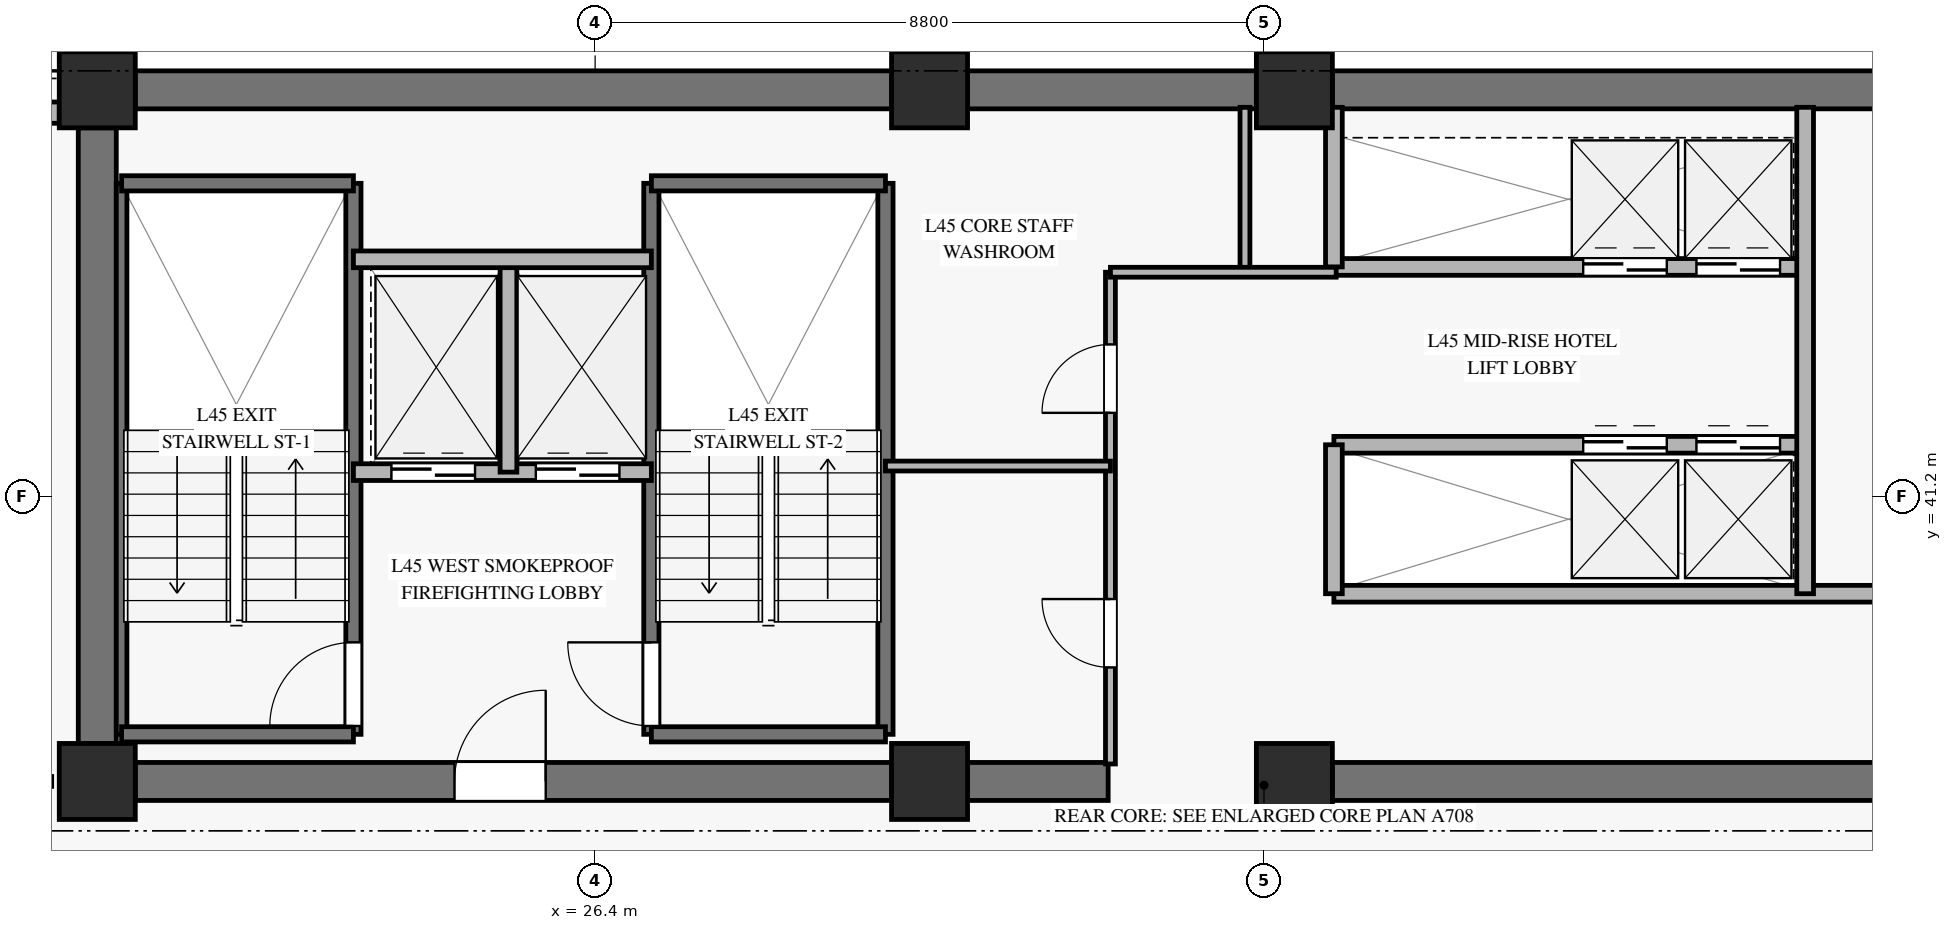
"""IFC4 building model, lengths in metres.
Left out: names, types, materials, properties, quantities, classifications, styles, units other than length and angle.
Written with IfcOpenShell. Run it as: python <this file> out.ifc"""

import sys

from ifc_helpers import new_model, si_unit, direction, frame, frame_2d, origin, origin_2d, place, context, subcontext, project, spatial, rectangle, extrude, source, transform, mapped, element, fill, save


model = new_model("IFC4")
c1 = context("Model", 3, precision=1e-05, world=origin(), true_north=direction((0.0, 1.0)))
c2 = subcontext(c1, "Body", "Model", "MODEL_VIEW")
j1 = project(units=[si_unit("LENGTHUNIT", "METRE"), si_unit("PLANEANGLEUNIT", "RADIAN")], contexts=[c1])
p1 = place(None, origin())
s1 = spatial("IfcSite", under=j1, at=p1, CompositionType="ELEMENT")
p2 = place(p1, origin())
s2 = spatial("IfcBuilding", under=s1, at=p2, CompositionType="ELEMENT")
p3 = place(p2, frame((0.0, 0.0, 180.7)))
s3 = spatial("IfcBuildingStorey", under=s2, at=p3, CompositionType="ELEMENT", Elevation=180.7)
m1 = source(origin(), c2, "Body", "SweptSolid", [
    extrude(rectangle(XDim=1.0, YDim=1.0, at=origin_2d()), origin(), (0.0, 0.0, 1.0), 3.27),
])
for number, where, z_axis, x_axis in (
    (1, (19.85, 37.45, 0.0), (0.0, 0.0, 1.0), (1.0, 0.0, 0.0)),
    (2, (19.85, 46.55, 0.0), (0.0, 0.0, 1.0), (1.0, 0.0, 0.0)),
    (3, (30.8, 37.45, 0.0), (0.0, 0.0, 1.0), (1.0, 0.0, 0.0)),
    (4, (30.8, 46.55, 0.0), (0.0, 0.0, 1.0), (1.0, 0.0, 0.0)),
    (5, (35.6, 37.45, 0.0), (0.0, 0.0, 1.0), (1.0, 0.0, 0.0)),
    (6, (35.6, 46.55, 0.0), (0.0, 0.0, 1.0), (1.0, 0.0, 0.0)),
):
    element("IfcColumn", number, at=place(p3, frame(where, z_axis=z_axis, x_axis=x_axis)), inside=s3, PredefinedType="PILASTER", context=c2, shape_type="MappedRepresentation", body=[
        mapped(m1, transform((0.0, 0.0, 0.0), x_axis=(1.0, 0.0, 0.0), y_axis=(0.0, 1.0, 0.0), z_axis=(0.0, 0.0, 1.0), scale=1.0)),
    ])
p4 = place(p3, frame((20.35, 46.55, 0.0), z_axis=(0.0, 0.0, 1.0), x_axis=(1.0, 0.0, 0.0)))
e7 = element("IfcWall", 7, at=p4, inside=s3, PredefinedType="SHEAR", context=c2, shape_type="SweptSolid", body=[
    extrude(rectangle(XDim=9.95, YDim=0.5, at=frame_2d((4.975, 0.0))), origin(), (0.0, 0.0, 1.0), 3.27),
])
p5 = place(p3, frame((31.3, 46.55, 0.0), z_axis=(0.0, 0.0, 1.0), x_axis=(1.0, 0.0, 0.0)))
e8 = element("IfcWall", 8, at=p5, inside=s3, PredefinedType="SHEAR", context=c2, shape_type="SweptSolid", body=[
    extrude(rectangle(XDim=3.8, YDim=0.5, at=frame_2d((1.9, 0.0))), origin(), (0.0, 0.0, 1.0), 3.27),
])
p6 = place(p3, frame((36.1, 46.55, 0.0), z_axis=(0.0, 0.0, 1.0), x_axis=(1.0, 0.0, 0.0)))
e9 = element("IfcWall", 9, at=p6, inside=s3, PredefinedType="SHEAR", context=c2, shape_type="SweptSolid", body=[
    extrude(rectangle(XDim=7.7, YDim=0.5, at=frame_2d((3.85, 0.0))), origin(), (0.0, 0.0, 1.0), 3.27),
])
p7 = place(p3, frame((20.35, 37.45, 0.0), z_axis=(0.0, 0.0, 1.0), x_axis=(1.0, 0.0, 0.0)))
e10 = element("IfcWall", 10, at=p7, inside=s3, PredefinedType="SHEAR", context=c2, shape_type="SweptSolid", body=[
    extrude(rectangle(XDim=9.95, YDim=0.5, at=frame_2d((4.975, 0.0))), origin(), (0.0, 0.0, 1.0), 3.27),
])
p8 = place(p7, frame((4.2, 0.0, 0.0)))
e11 = element("IfcOpeningElement", 11, at=p8, cuts=e10, PredefinedType="OPENING", context=c2, shape_type="SweptSolid", body=[
    extrude(rectangle(XDim=1.2, YDim=2.15, at=frame_2d((0.6, 1.075))), frame((0.0, 0.26, 0.0), z_axis=(0.0, -1.0, 0.0), x_axis=(1.0, 0.0, 0.0)), (0.0, 0.0, 1.0), 0.52),
])
p9 = place(p3, frame((31.3, 37.45, 0.0), z_axis=(0.0, 0.0, 1.0), x_axis=(1.0, 0.0, 0.0)))
e12 = element("IfcWall", 12, at=p9, inside=s3, PredefinedType="SHEAR", context=c2, shape_type="SweptSolid", body=[
    extrude(rectangle(XDim=1.85, YDim=0.5, at=frame_2d((0.925, 0.0))), origin(), (0.0, 0.0, 1.0), 3.27),
])
p10 = place(p3, frame((36.1, 37.45, 0.0), z_axis=(0.0, 0.0, 1.0), x_axis=(1.0, 0.0, 0.0)))
e13 = element("IfcWall", 13, at=p10, inside=s3, PredefinedType="SHEAR", context=c2, shape_type="SweptSolid", body=[
    extrude(rectangle(XDim=7.7, YDim=0.5, at=frame_2d((3.85, 0.0))), origin(), (0.0, 0.0, 1.0), 3.27),
])
p11 = place(p3, frame((19.85, 37.95, 0.0), z_axis=(0.0, 0.0, 1.0), x_axis=(0.0, 1.0, 0.0)))
e14 = element("IfcWall", 14, at=p11, inside=s3, PredefinedType="SHEAR", context=c2, shape_type="SweptSolid", body=[
    extrude(rectangle(XDim=8.1, YDim=0.5, at=frame_2d((4.05, 0.0))), origin(), (0.0, 0.0, 1.0), 3.27),
])
p12 = place(p3, frame((9.365, 46.25, 0.0), z_axis=(0.0, 0.0, 1.0), x_axis=(1.0, 0.0, 0.0)))
e15 = element("IfcWall", 15, at=p12, inside=s3, PredefinedType="SOLIDWALL", context=c2, shape_type="SweptSolid", body=[
    extrude(rectangle(XDim=9.985, YDim=0.28, at=frame_2d((4.993, 0.0))), origin(), (0.0, 0.0, 1.0), 2.75),
])
p13 = place(p12, frame((4.193, 0.0, 0.45)))
e16 = element("IfcOpeningElement", 16, at=p13, cuts=e15, PredefinedType="OPENING", context=c2, shape_type="SweptSolid", body=[
    extrude(rectangle(XDim=1.6, YDim=2.0, at=frame_2d((0.8, 1.0))), frame((0.0, 0.15, 0.0), z_axis=(0.0, -1.0, 0.0), x_axis=(1.0, 0.0, 0.0)), (0.0, 0.0, 1.0), 0.3),
])
p14 = place(p3, frame((20.17, 38.07, 0.0), z_axis=(0.0, 0.0, 1.0), x_axis=(0.0, 1.0, 0.0)))
e17 = element("IfcWall", 17, at=p14, inside=s3, PredefinedType="SOLIDWALL", context=c2, shape_type="SweptSolid", body=[
    extrude(rectangle(XDim=7.25, YDim=0.14, at=frame_2d((3.625, 0.0))), origin(), (0.0, 0.0, 1.0), 3.5),
])
p15 = place(p3, frame((23.22, 38.07, 0.0), z_axis=(0.0, 0.0, 1.0), x_axis=(0.0, 1.0, 0.0)))
e18 = element("IfcWall", 18, at=p15, inside=s3, PredefinedType="SOLIDWALL", context=c2, shape_type="SweptSolid", body=[
    extrude(rectangle(XDim=7.25, YDim=0.2, at=frame_2d((3.625, 0.0))), origin(), (0.0, 0.0, 1.0), 3.5),
])
p16 = place(p15, frame((0.11, 0.0, 0.0)))
e19 = element("IfcOpeningElement", 19, at=p16, cuts=e18, PredefinedType="OPENING", context=c2, shape_type="SweptSolid", body=[
    extrude(rectangle(XDim=1.1, YDim=2.15, at=frame_2d((0.55, 1.075))), frame((0.0, 0.11, 0.0), z_axis=(0.0, -1.0, 0.0), x_axis=(1.0, 0.0, 0.0)), (0.0, 0.0, 1.0), 0.22),
])
for number, where, z_axis, x_axis in (
    (20, (20.17, 45.32, 0.0), (0.0, 0.0, 1.0), (1.0, 0.0, 0.0)),
    (21, (20.17, 38.07, 0.0), (0.0, 0.0, 1.0), (1.0, 0.0, 0.0)),
):
    element("IfcWall", number, at=place(p3, frame(where, z_axis=z_axis, x_axis=x_axis)), inside=s3, PredefinedType="SOLIDWALL", context=c2, shape_type="SweptSolid", body=[
        extrude(rectangle(XDim=3.05, YDim=0.2, at=frame_2d((1.525, 0.0))), origin(), (0.0, 0.0, 1.0), 3.5),
    ])
p17 = place(p3, frame((27.14, 38.07, 0.0), z_axis=(0.0, 0.0, 1.0), x_axis=(0.0, 1.0, 0.0)))
e22 = element("IfcWall", 22, at=p17, inside=s3, PredefinedType="SOLIDWALL", context=c2, shape_type="SweptSolid", body=[
    extrude(rectangle(XDim=7.25, YDim=0.2, at=frame_2d((3.625, 0.0))), origin(), (0.0, 0.0, 1.0), 3.5),
])
p18 = place(p17, frame((0.11, 0.0, 0.0)))
e23 = element("IfcOpeningElement", 23, at=p18, cuts=e22, PredefinedType="OPENING", context=c2, shape_type="SweptSolid", body=[
    extrude(rectangle(XDim=1.1, YDim=2.15, at=frame_2d((0.55, 1.075))), frame((0.0, 0.11, 0.0), z_axis=(0.0, -1.0, 0.0), x_axis=(1.0, 0.0, 0.0)), (0.0, 0.0, 1.0), 0.22),
])
p19 = place(p3, frame((30.22, 38.07, 0.0), z_axis=(0.0, 0.0, 1.0), x_axis=(0.0, 1.0, 0.0)))
e24 = element("IfcWall", 24, at=p19, inside=s3, PredefinedType="SOLIDWALL", context=c2, shape_type="SweptSolid", body=[
    extrude(rectangle(XDim=7.25, YDim=0.2, at=frame_2d((3.625, 0.0))), origin(), (0.0, 0.0, 1.0), 3.5),
])
for number, where, z_axis, x_axis in (
    (25, (27.14, 45.32, 0.0), (0.0, 0.0, 1.0), (1.0, 0.0, 0.0)),
    (26, (27.14, 38.07, 0.0), (0.0, 0.0, 1.0), (1.0, 0.0, 0.0)),
):
    element("IfcWall", number, at=place(p3, frame(where, z_axis=z_axis, x_axis=x_axis)), inside=s3, PredefinedType="SOLIDWALL", context=c2, shape_type="SweptSolid", body=[
        extrude(rectangle(XDim=3.08, YDim=0.2, at=frame_2d((1.54, 0.0))), origin(), (0.0, 0.0, 1.0), 3.5),
    ])
p20 = place(p3, frame((23.22, 41.52, 0.0), z_axis=(0.0, 0.0, 1.0), x_axis=(1.0, 0.0, 0.0)))
e27 = element("IfcWall", 27, at=p20, inside=s3, PredefinedType="SOLIDWALL", context=c2, shape_type="SweptSolid", body=[
    extrude(rectangle(XDim=3.92, YDim=0.22, at=frame_2d((1.96, 0.0))), origin(), (0.0, 0.0, 1.0), 3.27),
])
p21 = place(p20, frame((0.5, 0.0, 0.0)))
e28 = element("IfcOpeningElement", 28, at=p21, cuts=e27, PredefinedType="OPENING", context=c2, shape_type="SweptSolid", body=[
    extrude(rectangle(XDim=1.1, YDim=2.2, at=frame_2d((0.55, 1.1))), frame((0.0, 0.12, 0.0), z_axis=(0.0, -1.0, 0.0), x_axis=(1.0, 0.0, 0.0)), (0.0, 0.0, 1.0), 0.24),
])
p22 = place(p20, frame((2.4, 0.0, 0.0)))
e29 = element("IfcOpeningElement", 29, at=p22, cuts=e27, PredefinedType="OPENING", context=c2, shape_type="SweptSolid", body=[
    extrude(rectangle(XDim=1.1, YDim=2.2, at=frame_2d((0.55, 1.1))), frame((0.0, 0.12, 0.0), z_axis=(0.0, -1.0, 0.0), x_axis=(1.0, 0.0, 0.0)), (0.0, 0.0, 1.0), 0.24),
])
p23 = place(p3, frame((25.26, 41.52, 0.0), z_axis=(0.0, 0.0, 1.0), x_axis=(0.0, 1.0, 0.0)))
e30 = element("IfcWall", 30, at=p23, inside=s3, PredefinedType="SOLIDWALL", context=c2, shape_type="SweptSolid", body=[
    extrude(rectangle(XDim=2.8, YDim=0.22, at=frame_2d((1.4, 0.0))), origin(), (0.0, 0.0, 1.0), 3.27),
])
p24 = place(p3, frame((23.22, 44.32, 0.0), z_axis=(0.0, 0.0, 1.0), x_axis=(1.0, 0.0, 0.0)))
e31 = element("IfcWall", 31, at=p24, inside=s3, PredefinedType="SOLIDWALL", context=c2, shape_type="SweptSolid", body=[
    extrude(rectangle(XDim=3.92, YDim=0.22, at=frame_2d((1.96, 0.0))), origin(), (0.0, 0.0, 1.0), 3.27),
])
p25 = place(p3, frame((36.12, 44.22, 0.0), z_axis=(0.0, 0.0, 1.0), x_axis=(1.0, 0.0, 0.0)))
e32 = element("IfcWall", 32, at=p25, inside=s3, PredefinedType="SOLIDWALL", context=c2, shape_type="SweptSolid", body=[
    extrude(rectangle(XDim=6.2, YDim=0.22, at=frame_2d((3.1, 0.0))), origin(), (0.0, 0.0, 1.0), 3.27),
])
p26 = place(p25, frame((3.28, 0.0, 0.0)))
e33 = element("IfcOpeningElement", 33, at=p26, cuts=e32, PredefinedType="OPENING", context=c2, shape_type="SweptSolid", body=[
    extrude(rectangle(XDim=1.1, YDim=2.2, at=frame_2d((0.55, 1.1))), frame((0.0, 0.12, 0.0), z_axis=(0.0, -1.0, 0.0), x_axis=(1.0, 0.0, 0.0)), (0.0, 0.0, 1.0), 0.24),
])
p27 = place(p25, frame((4.77, 0.0, 0.0)))
e34 = element("IfcOpeningElement", 34, at=p27, cuts=e32, PredefinedType="OPENING", context=c2, shape_type="SweptSolid", body=[
    extrude(rectangle(XDim=1.1, YDim=2.2, at=frame_2d((0.55, 1.1))), frame((0.0, 0.12, 0.0), z_axis=(0.0, -1.0, 0.0), x_axis=(1.0, 0.0, 0.0)), (0.0, 0.0, 1.0), 0.24),
])
p28 = place(p3, frame((36.12, 41.88, 0.0), z_axis=(0.0, 0.0, 1.0), x_axis=(1.0, 0.0, 0.0)))
e35 = element("IfcWall", 35, at=p28, inside=s3, PredefinedType="SOLIDWALL", context=c2, shape_type="SweptSolid", body=[
    extrude(rectangle(XDim=6.2, YDim=0.22, at=frame_2d((3.1, 0.0))), origin(), (0.0, 0.0, 1.0), 3.27),
])
p29 = place(p28, frame((3.28, 0.0, 0.0)))
e36 = element("IfcOpeningElement", 36, at=p29, cuts=e35, PredefinedType="OPENING", context=c2, shape_type="SweptSolid", body=[
    extrude(rectangle(XDim=1.1, YDim=2.2, at=frame_2d((0.55, 1.1))), frame((0.0, 0.12, 0.0), z_axis=(0.0, -1.0, 0.0), x_axis=(1.0, 0.0, 0.0)), (0.0, 0.0, 1.0), 0.24),
])
p30 = place(p28, frame((4.77, 0.0, 0.0)))
e37 = element("IfcOpeningElement", 37, at=p30, cuts=e35, PredefinedType="OPENING", context=c2, shape_type="SweptSolid", body=[
    extrude(rectangle(XDim=1.1, YDim=2.2, at=frame_2d((0.55, 1.1))), frame((0.0, 0.12, 0.0), z_axis=(0.0, -1.0, 0.0), x_axis=(1.0, 0.0, 0.0)), (0.0, 0.0, 1.0), 0.24),
])
p31 = place(p3, frame((36.12, 39.92, 0.0), z_axis=(0.0, 0.0, 1.0), x_axis=(1.0, 0.0, 0.0)))
e38 = element("IfcWall", 38, at=p31, inside=s3, PredefinedType="SOLIDWALL", context=c2, shape_type="SweptSolid", body=[
    extrude(rectangle(XDim=8.6, YDim=0.22, at=frame_2d((4.3, 0.0))), origin(), (0.0, 0.0, 1.0), 2.555),
])
p32 = place(p3, frame((42.32, 39.92, 0.0), z_axis=(0.0, 0.0, 1.0), x_axis=(0.0, 1.0, 0.0)))
e39 = element("IfcWall", 39, at=p32, inside=s3, PredefinedType="SOLIDWALL", context=c2, shape_type="SweptSolid", body=[
    extrude(rectangle(XDim=6.4, YDim=0.22, at=frame_2d((3.2, 0.0))), origin(), (0.0, 0.0, 1.0), 3.27),
])
p33 = place(p3, frame((36.12, 39.92, 0.0), z_axis=(0.0, 0.0, 1.0), x_axis=(0.0, 1.0, 0.0)))
e40 = element("IfcWall", 40, at=p33, inside=s3, PredefinedType="SOLIDWALL", context=c2, shape_type="SweptSolid", body=[
    extrude(rectangle(XDim=1.96, YDim=0.22, at=frame_2d((0.98, 0.0))), origin(), (0.0, 0.0, 1.0), 3.27),
])
p34 = place(p3, frame((36.12, 44.22, 0.0), z_axis=(0.0, 0.0, 1.0), x_axis=(0.0, 1.0, 0.0)))
e41 = element("IfcWall", 41, at=p34, inside=s3, PredefinedType="SOLIDWALL", context=c2, shape_type="SweptSolid", body=[
    extrude(rectangle(XDim=2.1, YDim=0.22, at=frame_2d((1.05, 0.0))), origin(), (0.0, 0.0, 1.0), 3.27),
])
p35 = place(p3, frame((33.18, 37.68, 0.0), z_axis=(0.0, 0.0, 1.0), x_axis=(0.0, 1.0, 0.0)))
e42 = element("IfcWall", 42, at=p35, inside=s3, PredefinedType="PARTITIONING", context=c2, shape_type="SweptSolid", body=[
    extrude(rectangle(XDim=6.47, YDim=0.13, at=frame_2d((3.235, 0.0))), origin(), (0.0, 0.0, 1.0), 2.355),
])
p36 = place(p35, frame((1.27, 0.0, 0.0)))
e43 = element("IfcOpeningElement", 43, at=p36, cuts=e42, PredefinedType="OPENING", context=c2, shape_type="SweptSolid", body=[
    extrude(rectangle(XDim=0.9, YDim=2.1, at=frame_2d((0.45, 1.05))), frame((0.0, 0.075, 0.0), z_axis=(0.0, -1.0, 0.0), x_axis=(1.0, 0.0, 0.0)), (0.0, 0.0, 1.0), 0.15),
])
p37 = place(p35, frame((4.62, 0.0, 0.0)))
e44 = element("IfcOpeningElement", 44, at=p37, cuts=e42, PredefinedType="OPENING", context=c2, shape_type="SweptSolid", body=[
    extrude(rectangle(XDim=0.9, YDim=2.1, at=frame_2d((0.45, 1.05))), frame((0.0, 0.075, 0.0), z_axis=(0.0, -1.0, 0.0), x_axis=(1.0, 0.0, 0.0)), (0.0, 0.0, 1.0), 0.15),
])
p38 = place(p3, frame((34.95, 44.15, 0.0), z_axis=(0.0, 0.0, 1.0), x_axis=(0.0, 1.0, 0.0)))
e45 = element("IfcWall", 45, at=p38, inside=s3, PredefinedType="PARTITIONING", context=c2, shape_type="SweptSolid", body=[
    extrude(rectangle(XDim=2.17, YDim=0.13, at=frame_2d((1.085, 0.0))), origin(), (0.0, 0.0, 1.0), 3.27),
])
p39 = place(p3, frame((33.18, 44.15, 0.0), z_axis=(0.0, 0.0, 1.0), x_axis=(1.0, 0.0, 0.0)))
e46 = element("IfcWall", 46, at=p39, inside=s3, PredefinedType="PARTITIONING", context=c2, shape_type="SweptSolid", body=[
    extrude(rectangle(XDim=2.97, YDim=0.13, at=frame_2d((1.485, 0.0))), origin(), (0.0, 0.0, 1.0), 2.555),
])
p40 = place(p3, frame((30.22, 41.6, 0.0), z_axis=(0.0, 0.0, 1.0), x_axis=(1.0, 0.0, 0.0)))
e47 = element("IfcWall", 47, at=p40, inside=s3, PredefinedType="PARTITIONING", context=c2, shape_type="SweptSolid", body=[
    extrude(rectangle(XDim=2.96, YDim=0.13, at=frame_2d((1.48, 0.0))), origin(), (0.0, 0.0, 1.0), 2.555),
])
m2 = source(origin(), c2, "Body", "SweptSolid", [
    extrude(rectangle(XDim=1.1, YDim=2.15, at=frame_2d((0.55, 1.075))), frame((0.0, 0.025, 0.0), z_axis=(0.0, -1.0, 0.0), x_axis=(1.0, 0.0, 0.0)), (0.0, 0.0, 1.0), 0.05),
])
p41 = place(p16, origin())
e48 = element("IfcDoor", 48, at=p41, inside=s3, OperationType="SINGLE_SWING_LEFT", PredefinedType="DOOR", context=c2, shape_type="MappedRepresentation", body=[
    mapped(m2, transform((0.0, 0.0, 0.0), x_axis=(1.0, 0.0, 0.0), y_axis=(0.0, 1.0, 0.0), z_axis=(0.0, 0.0, 1.0), scale=1.0)),
])
fill(e19, e48)
p42 = place(p18, origin())
e49 = element("IfcDoor", 49, at=p42, inside=s3, OperationType="SINGLE_SWING_RIGHT", PredefinedType="DOOR", context=c2, shape_type="MappedRepresentation", body=[
    mapped(m2, transform((0.0, 0.0, 0.0), x_axis=(1.0, 0.0, 0.0), y_axis=(0.0, 1.0, 0.0), z_axis=(0.0, 0.0, 1.0), scale=1.0)),
])
fill(e23, e49)
m3 = source(origin(), c2, "Body", "SweptSolid", [
    extrude(rectangle(XDim=1.1, YDim=2.2, at=frame_2d((0.55, 1.1))), frame((0.0, 0.025, 0.0), z_axis=(0.0, -1.0, 0.0), x_axis=(1.0, 0.0, 0.0)), (0.0, 0.0, 1.0), 0.05),
])
p43 = place(p21, origin())
e50 = element("IfcDoor", 50, at=p43, inside=s3, OperationType="SLIDING_TO_LEFT", PredefinedType="DOOR", context=c2, shape_type="MappedRepresentation", body=[
    mapped(m3, transform((0.0, 0.0, 0.0), x_axis=(1.0, 0.0, 0.0), y_axis=(0.0, 1.0, 0.0), z_axis=(0.0, 0.0, 1.0), scale=1.0)),
])
fill(e28, e50)
p44 = place(p22, origin())
e51 = element("IfcDoor", 51, at=p44, inside=s3, OperationType="SLIDING_TO_LEFT", PredefinedType="DOOR", context=c2, shape_type="MappedRepresentation", body=[
    mapped(m3, transform((0.0, 0.0, 0.0), x_axis=(1.0, 0.0, 0.0), y_axis=(0.0, 1.0, 0.0), z_axis=(0.0, 0.0, 1.0), scale=1.0)),
])
fill(e29, e51)
m4 = source(origin(), c2, "Body", "SweptSolid", [
    extrude(rectangle(XDim=1.2, YDim=2.15, at=frame_2d((0.6, 1.075))), frame((0.0, 0.025, 0.0), z_axis=(0.0, -1.0, 0.0), x_axis=(1.0, 0.0, 0.0)), (0.0, 0.0, 1.0), 0.05),
])
p45 = place(p8, origin())
e52 = element("IfcDoor", 52, at=p45, inside=s3, OperationType="SINGLE_SWING_RIGHT", PredefinedType="DOOR", context=c2, shape_type="MappedRepresentation", body=[
    mapped(m4, transform((0.0, 0.0, 0.0), x_axis=(1.0, 0.0, 0.0), y_axis=(0.0, 1.0, 0.0), z_axis=(0.0, 0.0, 1.0), scale=1.0)),
])
fill(e11, e52)
p46 = place(p26, origin())
e53 = element("IfcDoor", 53, at=p46, inside=s3, OperationType="SLIDING_TO_LEFT", PredefinedType="DOOR", context=c2, shape_type="MappedRepresentation", body=[
    mapped(m3, transform((0.0, 0.0, 0.0), x_axis=(1.0, 0.0, 0.0), y_axis=(0.0, 1.0, 0.0), z_axis=(0.0, 0.0, 1.0), scale=1.0)),
])
fill(e33, e53)
p47 = place(p27, origin())
e54 = element("IfcDoor", 54, at=p47, inside=s3, OperationType="SLIDING_TO_LEFT", PredefinedType="DOOR", context=c2, shape_type="MappedRepresentation", body=[
    mapped(m3, transform((0.0, 0.0, 0.0), x_axis=(1.0, 0.0, 0.0), y_axis=(0.0, 1.0, 0.0), z_axis=(0.0, 0.0, 1.0), scale=1.0)),
])
fill(e34, e54)
p48 = place(p29, origin())
e55 = element("IfcDoor", 55, at=p48, inside=s3, OperationType="SLIDING_TO_LEFT", PredefinedType="DOOR", context=c2, shape_type="MappedRepresentation", body=[
    mapped(m3, transform((0.0, 0.0, 0.0), x_axis=(1.0, 0.0, 0.0), y_axis=(0.0, 1.0, 0.0), z_axis=(0.0, 0.0, 1.0), scale=1.0)),
])
fill(e36, e55)
p49 = place(p30, origin())
e56 = element("IfcDoor", 56, at=p49, inside=s3, OperationType="SLIDING_TO_LEFT", PredefinedType="DOOR", context=c2, shape_type="MappedRepresentation", body=[
    mapped(m3, transform((0.0, 0.0, 0.0), x_axis=(1.0, 0.0, 0.0), y_axis=(0.0, 1.0, 0.0), z_axis=(0.0, 0.0, 1.0), scale=1.0)),
])
fill(e37, e56)
m5 = source(origin(), c2, "Body", "SweptSolid", [
    extrude(rectangle(XDim=0.9, YDim=2.1, at=frame_2d((0.45, 1.05))), frame((0.0, 0.025, 0.0), z_axis=(0.0, -1.0, 0.0), x_axis=(1.0, 0.0, 0.0)), (0.0, 0.0, 1.0), 0.05),
])
p50 = place(p36, origin())
e57 = element("IfcDoor", 57, at=p50, inside=s3, OperationType="SINGLE_SWING_RIGHT", PredefinedType="DOOR", context=c2, shape_type="MappedRepresentation", body=[
    mapped(m5, transform((0.0, 0.0, 0.0), x_axis=(1.0, 0.0, 0.0), y_axis=(0.0, 1.0, 0.0), z_axis=(0.0, 0.0, 1.0), scale=1.0)),
])
fill(e43, e57)
p51 = place(p37, origin())
e58 = element("IfcDoor", 58, at=p51, inside=s3, OperationType="SINGLE_SWING_LEFT", PredefinedType="DOOR", context=c2, shape_type="MappedRepresentation", body=[
    mapped(m5, transform((0.0, 0.0, 0.0), x_axis=(1.0, 0.0, 0.0), y_axis=(0.0, 1.0, 0.0), z_axis=(0.0, 0.0, 1.0), scale=1.0)),
])
fill(e44, e58)
save(model, sys.argv[1])
